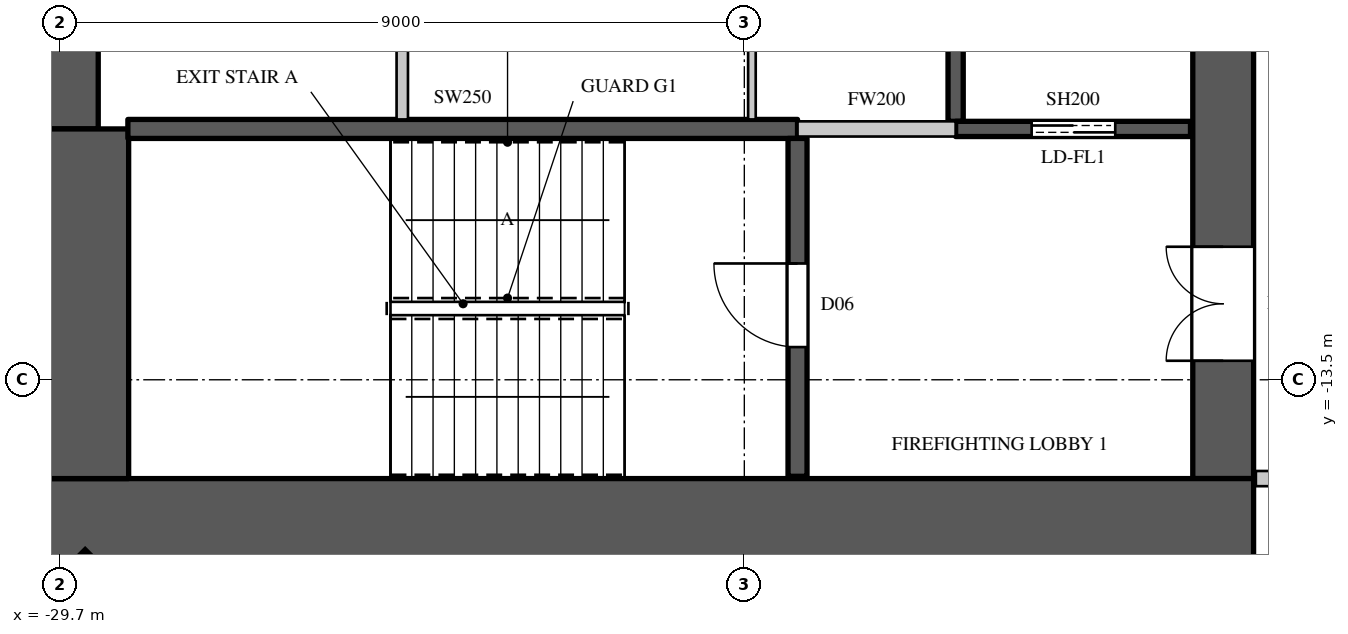
"""IFC4 building model, lengths in metres.
Left out: names, types, materials, properties, quantities, classifications, styles, units other than length and angle.
Written with IfcOpenShell. Run it as: python <this file> out.ifc"""

import sys

from ifc_helpers import new_model, si_unit, direction, frame, frame_2d, origin, origin_2d, place, context, subcontext, project, spatial, rectangle, extrude, element, fill, save


model = new_model("IFC4")
c1 = context("Model", 3, precision=1e-05, world=origin(), true_north=direction((0.0, 1.0)))
c2 = subcontext(c1, "Body", "Model", "MODEL_VIEW")
j1 = project(units=[si_unit("LENGTHUNIT", "METRE"), si_unit("PLANEANGLEUNIT", "RADIAN")], contexts=[c1])
p1 = place(None, origin())
s1 = spatial("IfcSite", under=j1, at=p1, CompositionType="ELEMENT")
p2 = place(p1, origin())
s2 = spatial("IfcBuilding", under=s1, at=p2, CompositionType="ELEMENT")
p3 = place(p2, frame((0.0, 0.0, 226.1)))
s3 = spatial("IfcBuildingStorey", under=s2, at=p3, CompositionType="ELEMENT", Elevation=226.1)
p4 = place(p3, frame((-29.443, -16.443, 0.0), z_axis=(0.0, 0.0, 1.0), x_axis=(0.707106781187, -0.707106781187, 0.0)))
e1 = element("IfcColumn", 1, at=p4, inside=s3, PredefinedType="COLUMN", context=c2, shape_type="SweptSolid", body=[
    extrude(rectangle(XDim=0.9, YDim=1.1, at=origin_2d()), origin(), (0.0, 0.0, 1.0), 4.1),
])
p5 = place(p3, frame((-30.0, -15.4, 0.0), z_axis=(0.0, 0.0, 1.0), x_axis=(1.0, 0.0, 0.0)))
e2 = element("IfcWall", 2, at=p5, inside=s3, PredefinedType="SHEAR", context=c2, shape_type="SweptSolid", body=[
    extrude(rectangle(XDim=16.0, YDim=1.2, at=frame_2d((8.0, 0.0))), origin(), (0.0, 0.0, 1.0), 4.1),
])
p6 = place(p3, frame((-14.4, -14.8, 0.0), z_axis=(0.0, 0.0, 1.0), x_axis=(0.0, 1.0, 0.0)))
e3 = element("IfcWall", 3, at=p6, inside=s3, PredefinedType="SHEAR", context=c2, shape_type="SweptSolid", body=[
    extrude(rectangle(XDim=29.6, YDim=0.8, at=frame_2d((14.8, 0.0))), origin(), (0.0, 0.0, 1.0), 4.1),
])
p7 = place(p6, frame((1.55, 0.0, 0.0)))
e4 = element("IfcOpeningElement", 4, at=p7, cuts=e3, PredefinedType="OPENING", context=c2, shape_type="SweptSolid", body=[
    extrude(rectangle(XDim=1.5, YDim=2.4, at=frame_2d((0.75, 1.2))), frame((0.0, 0.41, 0.0), z_axis=(0.0, -1.0, 0.0), x_axis=(1.0, 0.0, 0.0)), (0.0, 0.0, 1.0), 0.82),
])
p8 = place(p6, frame((26.55, 0.0, 0.0)))
e5 = element("IfcOpeningElement", 5, at=p8, cuts=e3, PredefinedType="OPENING", context=c2, shape_type="SweptSolid", body=[
    extrude(rectangle(XDim=1.5, YDim=2.4, at=frame_2d((0.75, 1.2))), frame((0.0, 0.41, 0.0), z_axis=(0.0, -1.0, 0.0), x_axis=(1.0, 0.0, 0.0)), (0.0, 0.0, 1.0), 0.82),
])
p9 = place(p6, frame((8.45, 0.0, 0.0)))
e6 = element("IfcOpeningElement", 6, at=p9, cuts=e3, PredefinedType="OPENING", context=c2, shape_type="SweptSolid", body=[
    extrude(rectangle(XDim=1.5, YDim=2.4, at=frame_2d((0.75, 1.2))), frame((0.0, 0.41, 0.0), z_axis=(0.0, -1.0, 0.0), x_axis=(1.0, 0.0, 0.0)), (0.0, 0.0, 1.0), 0.82),
])
p10 = place(p6, frame((19.65, 0.0, 0.0)))
e7 = element("IfcOpeningElement", 7, at=p10, cuts=e3, PredefinedType="OPENING", context=c2, shape_type="SweptSolid", body=[
    extrude(rectangle(XDim=1.5, YDim=2.4, at=frame_2d((0.75, 1.2))), frame((0.0, 0.41, 0.0), z_axis=(0.0, -1.0, 0.0), x_axis=(1.0, 0.0, 0.0)), (0.0, 0.0, 1.0), 0.82),
])
p11 = place(p6, frame((14.5, 0.0, 0.0)))
e8 = element("IfcOpeningElement", 8, at=p11, cuts=e3, PredefinedType="OPENING", context=c2, shape_type="SweptSolid", body=[
    extrude(rectangle(XDim=0.6, YDim=2.0, at=frame_2d((0.3, 1.0))), frame((0.0, 0.41, 0.0), z_axis=(0.0, -1.0, 0.0), x_axis=(1.0, 0.0, 0.0)), (0.0, 0.0, 1.0), 0.82),
])
p12 = place(p3, frame((-29.6, -10.2, 0.0), z_axis=(0.0, 0.0, 1.0), x_axis=(0.0, 1.0, 0.0)))
e9 = element("IfcWall", 9, at=p12, inside=s3, PredefinedType="SHEAR", context=c2, shape_type="SweptSolid", body=[
    extrude(rectangle(XDim=20.4, YDim=0.8, at=frame_2d((10.2, 0.0))), origin(), (0.0, 0.0, 1.0), 4.1),
])
p13 = place(p3, frame((-29.4, -14.8, 0.0), z_axis=(0.0, 0.0, 1.0), x_axis=(0.0, 1.0, 0.0)))
e10 = element("IfcWall", 10, at=p13, inside=s3, PredefinedType="SHEAR", context=c2, shape_type="SweptSolid", body=[
    extrude(rectangle(XDim=4.6, YDim=1.2, at=frame_2d((2.3, 0.0))), origin(), (0.0, 0.0, 1.0), 4.1),
])
p14 = place(p3, frame((-20.0, -10.2, 0.0), z_axis=(0.0, 0.0, 1.0), x_axis=(1.0, 0.0, 0.0)))
e11 = element("IfcWall", 11, at=p14, inside=s3, PredefinedType="PARTITIONING", context=c2, shape_type="SweptSolid", body=[
    extrude(rectangle(XDim=2.08, YDim=0.2, at=frame_2d((1.04, 0.0))), origin(), (0.0, 0.0, 1.0), 3.8),
])
p15 = place(p3, frame((-13.97, -14.8, 0.0), z_axis=(0.0, 0.0, 1.0), x_axis=(1.0, 0.0, 0.0)))
e12 = element("IfcWall", 12, at=p15, inside=s3, PredefinedType="PARTITIONING", context=c2, shape_type="SweptSolid", body=[
    extrude(rectangle(XDim=2.87, YDim=0.2, at=frame_2d((1.435, 0.0))), origin(), (0.0, 0.0, 1.0), 3.8),
])
p16 = place(p3, frame((-25.2, -10.075, 0.0), z_axis=(0.0, 0.0, 1.0), x_axis=(0.0, 1.0, 0.0)))
e13 = element("IfcWall", 13, at=p16, inside=s3, PredefinedType="PARTITIONING", context=c2, shape_type="SweptSolid", body=[
    extrude(rectangle(XDim=2.575, YDim=0.15, at=frame_2d((1.288, 0.0))), origin(), (0.0, 0.0, 1.0), 3.8),
])
p17 = place(p3, frame((-17.92, -10.1, 0.0), z_axis=(0.0, 0.0, 1.0), x_axis=(0.0, 1.0, 0.0)))
e14 = element("IfcWall", 14, at=p17, inside=s3, PredefinedType="SHEAR", context=c2, shape_type="SweptSolid", body=[
    extrude(rectangle(XDim=2.6, YDim=0.2, at=frame_2d((1.3, 0.0))), origin(), (0.0, 0.0, 1.0), 3.8),
])
p18 = place(p3, frame((-17.92, -10.2, 0.0), z_axis=(0.0, 0.0, 1.0), x_axis=(1.0, 0.0, 0.0)))
e15 = element("IfcWall", 15, at=p18, inside=s3, PredefinedType="SHEAR", context=c2, shape_type="SweptSolid", body=[
    extrude(rectangle(XDim=3.09, YDim=0.2, at=frame_2d((1.545, 0.0))), origin(), (0.0, 0.0, 1.0), 3.8),
])
p19 = place(p18, frame((1.0, 0.0, 0.0)))
e16 = element("IfcOpeningElement", 16, at=p19, cuts=e15, PredefinedType="OPENING", context=c2, shape_type="SweptSolid", body=[
    extrude(rectangle(XDim=1.1, YDim=2.2, at=frame_2d((0.55, 1.1))), frame((0.0, 0.11, 0.0), z_axis=(0.0, -1.0, 0.0), x_axis=(1.0, 0.0, 0.0)), (0.0, 0.0, 1.0), 0.22),
])
p20 = place(p3, frame((-28.81, -10.2, 0.0), z_axis=(0.0, 0.0, 1.0), x_axis=(1.0, 0.0, 0.0)))
e17 = element("IfcWall", 17, at=p20, inside=s3, PredefinedType="SHEAR", context=c2, shape_type="SweptSolid", body=[
    extrude(rectangle(XDim=8.81, YDim=0.25, at=frame_2d((4.405, 0.0))), origin(), (0.0, 0.0, 1.0), 3.8),
])
p21 = place(p3, frame((-20.0, -14.77, 0.0), z_axis=(0.0, 0.0, 1.0), x_axis=(0.0, 1.0, 0.0)))
e18 = element("IfcWall", 18, at=p21, inside=s3, PredefinedType="SHEAR", context=c2, shape_type="SweptSolid", body=[
    extrude(rectangle(XDim=4.445, YDim=0.25, at=frame_2d((2.223, 0.0))), origin(), (0.0, 0.0, 1.0), 3.8),
])
p22 = place(p21, frame((1.7, 0.0, 0.0)))
e19 = element("IfcOpeningElement", 19, at=p22, cuts=e18, PredefinedType="OPENING", context=c2, shape_type="SweptSolid", body=[
    extrude(rectangle(XDim=1.1, YDim=2.2, at=frame_2d((0.55, 1.1))), frame((0.0, 0.135, 0.0), z_axis=(0.0, -1.0, 0.0), x_axis=(1.0, 0.0, 0.0)), (0.0, 0.0, 1.0), 0.27),
])
p23 = place(p3, frame((-20.6, -10.075, 0.0), z_axis=(0.0, 0.0, 1.0), x_axis=(0.0, 1.0, 0.0)))
e20 = element("IfcWall", 20, at=p23, inside=s3, PredefinedType="PARTITIONING", context=c2, shape_type="SweptSolid", body=[
    extrude(rectangle(XDim=2.575, YDim=0.1, at=frame_2d((1.288, 0.0))), origin(), (0.0, 0.0, 1.0), 3.8),
])
p24 = place(p22, origin())
e21 = element("IfcDoor", 21, at=p24, inside=s3, OperationType="SINGLE_SWING_RIGHT", PredefinedType="DOOR", context=c2, shape_type="SweptSolid", body=[
    extrude(rectangle(XDim=1.1, YDim=2.2, at=frame_2d((0.55, 1.1))), frame((0.0, 0.025, 0.0), z_axis=(0.0, -1.0, 0.0), x_axis=(1.0, 0.0, 0.0)), (0.0, 0.0, 1.0), 0.05),
])
fill(e19, e21)
p25 = place(p19, origin())
e22 = element("IfcDoor", 22, at=p25, inside=s3, OperationType="DOUBLE_DOOR_SLIDING", PredefinedType="DOOR", context=c2, shape_type="SweptSolid", body=[
    extrude(rectangle(XDim=1.1, YDim=2.2, at=frame_2d((0.55, 1.1))), frame((0.0, 0.025, 0.0), z_axis=(0.0, -1.0, 0.0), x_axis=(1.0, 0.0, 0.0)), (0.0, 0.0, 1.0), 0.05),
])
fill(e16, e22)
p26 = place(p7, origin())
e23 = element("IfcDoor", 23, at=p26, inside=s3, OperationType="DOUBLE_DOOR_SINGLE_SWING", PredefinedType="DOOR", context=c2, shape_type="SweptSolid", body=[
    extrude(rectangle(XDim=1.5, YDim=2.4, at=frame_2d((0.75, 1.2))), frame((0.0, 0.395, 0.0), z_axis=(0.0, -1.0, 0.0), x_axis=(1.0, 0.0, 0.0)), (0.0, 0.0, 1.0), 0.05),
])
fill(e4, e23)
save(model, sys.argv[1])
